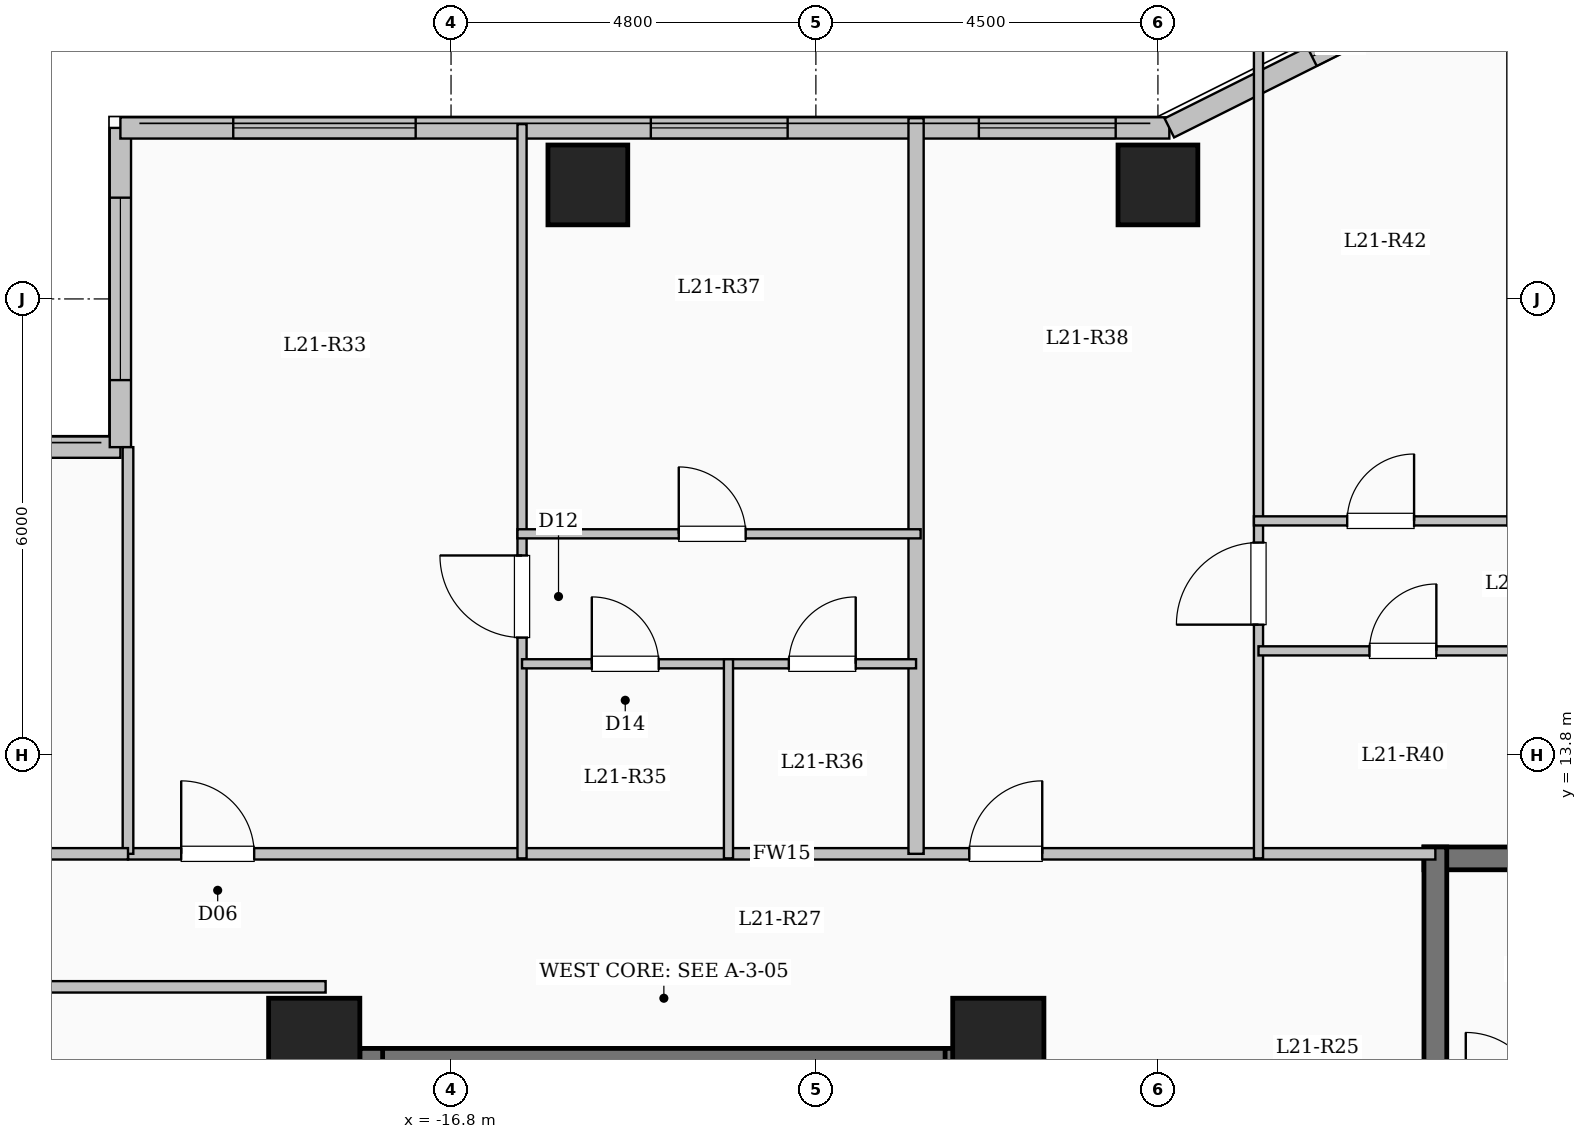
"""IFC4 building model, lengths in metres.
Left out: names, types, materials, properties, quantities, classifications, styles, units other than length and angle.
Written with IfcOpenShell. Run it as: python <this file> out.ifc"""

import sys

from ifc_helpers import new_model, si_unit, direction, frame, frame_2d, origin, origin_2d, place, context, subcontext, project, spatial, rectangle, extrude, element, fill, save


model = new_model("IFC4")
c1 = context("Model", 3, precision=1e-05, world=origin(), true_north=direction((0.0, 1.0)))
c2 = subcontext(c1, "Body", "Model", "MODEL_VIEW")
j1 = project(units=[si_unit("LENGTHUNIT", "METRE"), si_unit("PLANEANGLEUNIT", "RADIAN")], contexts=[c1])
p1 = place(None, origin())
s1 = spatial("IfcSite", under=j1, at=p1, CompositionType="ELEMENT")
p2 = place(p1, origin())
s2 = spatial("IfcBuilding", under=s1, at=p2, CompositionType="ELEMENT")
p3 = place(p2, frame((0.0, 0.0, 81.65)))
s3 = spatial("IfcBuildingStorey", under=s2, at=p3, CompositionType="ELEMENT", Elevation=81.65)
for number, where, z_axis, x_axis in (
    (1, (-9.6, 10.0, 0.0), (0.0, 0.0, 1.0), (1.0, 0.0, 0.0)),
    (2, (-18.6, 10.0, 0.0), (0.0, 0.0, 1.0), (1.0, 0.0, 0.0)),
):
    element("IfcColumn", number, at=place(p3, frame(where, z_axis=z_axis, x_axis=x_axis)), inside=s3, PredefinedType="COLUMN", context=c2, shape_type="SweptSolid", body=[
        extrude(rectangle(XDim=1.2, YDim=1.2, at=origin_2d()), origin(), (0.0, 0.0, 1.0), 3.35),
    ])
for number, where, z_axis, x_axis in (
    (3, (-15.0, 21.3, 0.0), (0.0, 0.0, 1.0), (1.0, 0.0, 0.0)),
    (4, (-7.5, 21.3, 0.0), (0.0, 0.0, 1.0), (1.0, 0.0, 0.0)),
):
    element("IfcColumn", number, at=place(p3, frame(where, z_axis=z_axis, x_axis=x_axis)), inside=s3, PredefinedType="COLUMN", context=c2, shape_type="SweptSolid", body=[
        extrude(rectangle(XDim=1.05, YDim=1.05, at=origin_2d()), origin(), (0.0, 0.0, 1.0), 3.35),
    ])
p4 = place(p3, frame((-26.85, 17.85, 0.0), z_axis=(0.0, 0.0, 1.0), x_axis=(1.0, 0.0, 0.0)))
e5 = element("IfcWall", 5, at=p4, inside=s3, PredefinedType="SOLIDWALL", context=c2, shape_type="SweptSolid", body=[
    extrude(rectangle(XDim=5.7, YDim=0.28, at=frame_2d((2.85, 0.0))), origin(), (0.0, 0.0, 1.0), 3.1),
])
p5 = place(p4, frame((1.875, 0.0, 0.9)))
e6 = element("IfcOpeningElement", 6, at=p5, cuts=e5, PredefinedType="OPENING", context=c2, shape_type="SweptSolid", body=[
    extrude(rectangle(XDim=2.0, YDim=1.7, at=frame_2d((1.0, 0.85))), frame((0.0, 0.15, 0.0), z_axis=(0.0, -1.0, 0.0), x_axis=(1.0, 0.0, 0.0)), (0.0, 0.0, 1.0), 0.3),
])
p6 = place(p3, frame((-21.15, 17.85, 0.0), z_axis=(0.0, 0.0, 1.0), x_axis=(0.0, 1.0, 0.0)))
e7 = element("IfcWall", 7, at=p6, inside=s3, PredefinedType="SOLIDWALL", context=c2, shape_type="SweptSolid", body=[
    extrude(rectangle(XDim=4.2, YDim=0.28, at=frame_2d((2.1, 0.0))), origin(), (0.0, 0.0, 1.0), 3.1),
])
p7 = place(p6, frame((0.882, 0.0, 0.9)))
e8 = element("IfcOpeningElement", 8, at=p7, cuts=e7, PredefinedType="OPENING", context=c2, shape_type="SweptSolid", body=[
    extrude(rectangle(XDim=2.4, YDim=1.8, at=frame_2d((1.2, 0.9))), frame((0.0, 0.15, 0.0), z_axis=(0.0, -1.0, 0.0), x_axis=(1.0, 0.0, 0.0)), (0.0, 0.0, 1.0), 0.3),
])
p8 = place(p3, frame((-21.15, 22.05, 0.0), z_axis=(0.0, 0.0, 1.0), x_axis=(1.0, 0.0, 0.0)))
e9 = element("IfcWall", 9, at=p8, inside=s3, PredefinedType="SOLIDWALL", context=c2, shape_type="SweptSolid", body=[
    extrude(rectangle(XDim=13.8, YDim=0.28, at=frame_2d((6.9, 0.0))), origin(), (0.0, 0.0, 1.0), 3.1),
])
p9 = place(p8, frame((1.485, 0.0, 0.9)))
e10 = element("IfcOpeningElement", 10, at=p9, cuts=e9, PredefinedType="OPENING", context=c2, shape_type="SweptSolid", body=[
    extrude(rectangle(XDim=2.4, YDim=1.8, at=frame_2d((1.2, 0.9))), frame((0.0, 0.15, 0.0), z_axis=(0.0, -1.0, 0.0), x_axis=(1.0, 0.0, 0.0)), (0.0, 0.0, 1.0), 0.3),
])
p10 = place(p8, frame((6.979, 0.0, 0.9)))
e11 = element("IfcOpeningElement", 11, at=p10, cuts=e9, PredefinedType="OPENING", context=c2, shape_type="SweptSolid", body=[
    extrude(rectangle(XDim=1.8, YDim=1.65, at=frame_2d((0.9, 0.825))), frame((0.0, 0.15, 0.0), z_axis=(0.0, -1.0, 0.0), x_axis=(1.0, 0.0, 0.0)), (0.0, 0.0, 1.0), 0.3),
])
p11 = place(p8, frame((11.294, 0.0, 0.9)))
e12 = element("IfcOpeningElement", 12, at=p11, cuts=e9, PredefinedType="OPENING", context=c2, shape_type="SweptSolid", body=[
    extrude(rectangle(XDim=1.8, YDim=1.65, at=frame_2d((0.9, 0.825))), frame((0.0, 0.15, 0.0), z_axis=(0.0, -1.0, 0.0), x_axis=(1.0, 0.0, 0.0)), (0.0, 0.0, 1.0), 0.3),
])
p12 = place(p3, frame((-7.35, 22.05, 0.0), z_axis=(0.0, 0.0, 1.0), x_axis=(0.894427191, 0.4472135955, 0.0)))
e13 = element("IfcWall", 13, at=p12, inside=s3, PredefinedType="SOLIDWALL", context=c2, shape_type="SweptSolid", body=[
    extrude(rectangle(XDim=3.354, YDim=0.28, at=frame_2d((1.677, 0.0))), origin(), (0.0, 0.0, 1.0), 3.1),
])
p13 = place(p12, frame((2.099, 0.0, 0.95)))
e14 = element("IfcOpeningElement", 14, at=p13, cuts=e13, PredefinedType="OPENING", context=c2, shape_type="SweptSolid", body=[
    extrude(rectangle(XDim=0.85, YDim=1.5, at=frame_2d((0.425, 0.75))), frame((0.0, 0.15, 0.0), z_axis=(0.0, -1.0, 0.0), x_axis=(1.0, 0.0, 0.0)), (0.0, 0.0, 1.0), 0.3),
])
p14 = place(p3, frame((-18.0, 9.79, 0.0), z_axis=(0.0, 0.0, 1.0), x_axis=(1.0, 0.0, 0.0)))
e15 = element("IfcWall", 15, at=p14, inside=s3, PredefinedType="SHEAR", context=c2, shape_type="SweptSolid", body=[
    extrude(rectangle(XDim=8.0, YDim=0.3, at=frame_2d((4.0, 0.0))), origin(), (0.0, 0.0, 1.0), 3.35),
])
for number, where, z_axis, x_axis in (
    (16, (-17.85, 6.35, 0.0), (0.0, 0.0, 1.0), (0.0, 1.0, 0.0)),
    (17, (-10.15, 6.35, 0.0), (0.0, 0.0, 1.0), (0.0, 1.0, 0.0)),
):
    element("IfcWall", number, at=place(p3, frame(where, z_axis=z_axis, x_axis=x_axis)), inside=s3, PredefinedType="SHEAR", context=c2, shape_type="SweptSolid", body=[
        extrude(rectangle(XDim=3.59, YDim=0.3, at=frame_2d((1.795, 0.0))), origin(), (0.0, 0.0, 1.0), 3.35),
    ])
p15 = place(p3, frame((-4.0, 12.44, 0.0), z_axis=(0.0, 0.0, 1.0), x_axis=(1.0, 0.0, 0.0)))
e18 = element("IfcWall", 18, at=p15, inside=s3, PredefinedType="SHEAR", context=c2, shape_type="SweptSolid", body=[
    extrude(rectangle(XDim=8.0, YDim=0.3, at=frame_2d((4.0, 0.0))), origin(), (0.0, 0.0, 1.0), 3.35),
])
p16 = place(p3, frame((-3.85, 9.0, 0.0), z_axis=(0.0, 0.0, 1.0), x_axis=(0.0, 1.0, 0.0)))
e19 = element("IfcWall", 19, at=p16, inside=s3, PredefinedType="SHEAR", context=c2, shape_type="SweptSolid", body=[
    extrude(rectangle(XDim=3.59, YDim=0.3, at=frame_2d((1.795, 0.0))), origin(), (0.0, 0.0, 1.0), 3.35),
])
p17 = place(p3, frame((-21.05, 12.5, 0.0), z_axis=(0.0, 0.0, 1.0), x_axis=(1.0, 0.0, 0.0)))
e20 = element("IfcWall", 20, at=p17, inside=s3, PredefinedType="PARTITIONING", context=c2, shape_type="SweptSolid", body=[
    extrude(rectangle(XDim=17.2, YDim=0.15, at=frame_2d((8.6, 0.0))), origin(), (0.0, 0.0, 1.0), 3.1),
])
p18 = place(p17, frame((0.7, 0.0, 0.0)))
e21 = element("IfcOpeningElement", 21, at=p18, cuts=e20, PredefinedType="OPENING", context=c2, shape_type="SweptSolid", body=[
    extrude(rectangle(XDim=0.96, YDim=2.15, at=frame_2d((0.48, 1.075))), frame((0.0, 0.085, 0.0), z_axis=(0.0, -1.0, 0.0), x_axis=(1.0, 0.0, 0.0)), (0.0, 0.0, 1.0), 0.17),
])
p19 = place(p17, frame((11.068, 0.0, 0.0)))
e22 = element("IfcOpeningElement", 22, at=p19, cuts=e20, PredefinedType="OPENING", context=c2, shape_type="SweptSolid", body=[
    extrude(rectangle(XDim=0.96, YDim=2.15, at=frame_2d((0.48, 1.075))), frame((0.0, 0.085, 0.0), z_axis=(0.0, -1.0, 0.0), x_axis=(1.0, 0.0, 0.0)), (0.0, 0.0, 1.0), 0.17),
])
p20 = place(p3, frame((-10.682, 12.5, 0.0), z_axis=(0.0, 0.0, 1.0), x_axis=(0.0, 1.0, 0.0)))
e23 = element("IfcWall", 23, at=p20, inside=s3, PredefinedType="SOLIDWALL", context=c2, shape_type="SweptSolid", body=[
    extrude(rectangle(XDim=9.678, YDim=0.2, at=frame_2d((4.839, 0.0))), origin(), (0.0, 0.0, 1.0), 3.1),
])
p21 = place(p3, frame((-15.866, 12.44, 0.0), z_axis=(0.0, 0.0, 1.0), x_axis=(0.0, 1.0, 0.0)))
e24 = element("IfcWall", 24, at=p21, inside=s3, PredefinedType="PARTITIONING", context=c2, shape_type="SweptSolid", body=[
    extrude(rectangle(XDim=9.66, YDim=0.12, at=frame_2d((4.83, 0.0))), origin(), (0.0, 0.0, 1.0), 3.1),
])
p22 = place(p21, frame((2.905, 0.0, 0.0)))
e25 = element("IfcOpeningElement", 25, at=p22, cuts=e24, PredefinedType="OPENING", context=c2, shape_type="SweptSolid", body=[
    extrude(rectangle(XDim=1.08, YDim=2.15, at=frame_2d((0.54, 1.075))), frame((0.0, 0.07, 0.0), z_axis=(0.0, -1.0, 0.0), x_axis=(1.0, 0.0, 0.0)), (0.0, 0.0, 1.0), 0.14),
])
p23 = place(p3, frame((-15.866, 15.0, 0.0), z_axis=(0.0, 0.0, 1.0), x_axis=(1.0, 0.0, 0.0)))
e26 = element("IfcWall", 26, at=p23, inside=s3, PredefinedType="PARTITIONING", context=c2, shape_type="SweptSolid", body=[
    extrude(rectangle(XDim=2.716, YDim=0.12, at=frame_2d((1.358, 0.0))), origin(), (0.0, 0.0, 1.0), 3.1),
])
p24 = place(p23, frame((0.918, 0.0, 0.0)))
e27 = element("IfcOpeningElement", 27, at=p24, cuts=e26, PredefinedType="OPENING", context=c2, shape_type="SweptSolid", body=[
    extrude(rectangle(XDim=0.88, YDim=2.1, at=frame_2d((0.44, 1.05))), frame((0.0, 0.07, 0.0), z_axis=(0.0, -1.0, 0.0), x_axis=(1.0, 0.0, 0.0)), (0.0, 0.0, 1.0), 0.14),
])
p25 = place(p3, frame((-13.15, 15.0, 0.0), z_axis=(0.0, 0.0, 1.0), x_axis=(1.0, 0.0, 0.0)))
e28 = element("IfcWall", 28, at=p25, inside=s3, PredefinedType="PARTITIONING", context=c2, shape_type="SweptSolid", body=[
    extrude(rectangle(XDim=2.468, YDim=0.12, at=frame_2d((1.234, 0.0))), origin(), (0.0, 0.0, 1.0), 3.1),
])
p26 = place(p25, frame((0.794, 0.0, 0.0)))
e29 = element("IfcOpeningElement", 29, at=p26, cuts=e28, PredefinedType="OPENING", context=c2, shape_type="SweptSolid", body=[
    extrude(rectangle(XDim=0.88, YDim=2.1, at=frame_2d((0.44, 1.05))), frame((0.0, 0.07, 0.0), z_axis=(0.0, -1.0, 0.0), x_axis=(1.0, 0.0, 0.0)), (0.0, 0.0, 1.0), 0.14),
])
p27 = place(p3, frame((-15.926, 16.71, 0.0), z_axis=(0.0, 0.0, 1.0), x_axis=(1.0, 0.0, 0.0)))
e30 = element("IfcWall", 30, at=p27, inside=s3, PredefinedType="PARTITIONING", context=c2, shape_type="SweptSolid", body=[
    extrude(rectangle(XDim=5.304, YDim=0.12, at=frame_2d((2.652, 0.0))), origin(), (0.0, 0.0, 1.0), 3.1),
])
p28 = place(p27, frame((2.122, 0.0, 0.0)))
e31 = element("IfcOpeningElement", 31, at=p28, cuts=e30, PredefinedType="OPENING", context=c2, shape_type="SweptSolid", body=[
    extrude(rectangle(XDim=0.88, YDim=2.1, at=frame_2d((0.44, 1.05))), frame((0.0, 0.07, 0.0), z_axis=(0.0, -1.0, 0.0), x_axis=(1.0, 0.0, 0.0)), (0.0, 0.0, 1.0), 0.14),
])
p29 = place(p3, frame((-13.15, 12.44, 0.0), z_axis=(0.0, 0.0, 1.0), x_axis=(0.0, 1.0, 0.0)))
e32 = element("IfcWall", 32, at=p29, inside=s3, PredefinedType="PARTITIONING", context=c2, shape_type="SweptSolid", body=[
    extrude(rectangle(XDim=2.62, YDim=0.12, at=frame_2d((1.31, 0.0))), origin(), (0.0, 0.0, 1.0), 3.1),
])
p30 = place(p3, frame((-6.177, 12.44, 0.0), z_axis=(0.0, 0.0, 1.0), x_axis=(0.0, 1.0, 0.0)))
e33 = element("IfcWall", 33, at=p30, inside=s3, PredefinedType="PARTITIONING", context=c2, shape_type="SweptSolid", body=[
    extrude(rectangle(XDim=10.85, YDim=0.12, at=frame_2d((5.425, 0.0))), origin(), (0.0, 0.0, 1.0), 3.1),
])
p31 = place(p30, frame((3.075, 0.0, 0.0)))
e34 = element("IfcOpeningElement", 34, at=p31, cuts=e33, PredefinedType="OPENING", context=c2, shape_type="SweptSolid", body=[
    extrude(rectangle(XDim=1.08, YDim=2.15, at=frame_2d((0.54, 1.075))), frame((0.0, 0.07, 0.0), z_axis=(0.0, -1.0, 0.0), x_axis=(1.0, 0.0, 0.0)), (0.0, 0.0, 1.0), 0.14),
])
p32 = place(p3, frame((-6.177, 15.17, 0.0), z_axis=(0.0, 0.0, 1.0), x_axis=(1.0, 0.0, 0.0)))
e35 = element("IfcWall", 35, at=p32, inside=s3, PredefinedType="PARTITIONING", context=c2, shape_type="SweptSolid", body=[
    extrude(rectangle(XDim=3.8, YDim=0.12, at=frame_2d((1.9, 0.0))), origin(), (0.0, 0.0, 1.0), 3.1),
])
p33 = place(p32, frame((1.46, 0.0, 0.0)))
e36 = element("IfcOpeningElement", 36, at=p33, cuts=e35, PredefinedType="OPENING", context=c2, shape_type="SweptSolid", body=[
    extrude(rectangle(XDim=0.88, YDim=2.1, at=frame_2d((0.44, 1.05))), frame((0.0, 0.07, 0.0), z_axis=(0.0, -1.0, 0.0), x_axis=(1.0, 0.0, 0.0)), (0.0, 0.0, 1.0), 0.14),
])
p34 = place(p3, frame((-6.237, 16.88, 0.0), z_axis=(0.0, 0.0, 1.0), x_axis=(1.0, 0.0, 0.0)))
e37 = element("IfcWall", 37, at=p34, inside=s3, PredefinedType="PARTITIONING", context=c2, shape_type="SweptSolid", body=[
    extrude(rectangle(XDim=6.847, YDim=0.12, at=frame_2d((3.424, 0.0))), origin(), (0.0, 0.0, 1.0), 3.1),
])
p35 = place(p34, frame((1.227, 0.0, 0.0)))
e38 = element("IfcOpeningElement", 38, at=p35, cuts=e37, PredefinedType="OPENING", context=c2, shape_type="SweptSolid", body=[
    extrude(rectangle(XDim=0.88, YDim=2.1, at=frame_2d((0.44, 1.05))), frame((0.0, 0.07, 0.0), z_axis=(0.0, -1.0, 0.0), x_axis=(1.0, 0.0, 0.0)), (0.0, 0.0, 1.0), 0.14),
])
p36 = place(p34, frame((4.56, 0.0, 0.0)))
e39 = element("IfcOpeningElement", 39, at=p36, cuts=e37, PredefinedType="OPENING", context=c2, shape_type="SweptSolid", body=[
    extrude(rectangle(XDim=0.88, YDim=2.1, at=frame_2d((0.44, 1.05))), frame((0.0, 0.07, 0.0), z_axis=(0.0, -1.0, 0.0), x_axis=(1.0, 0.0, 0.0)), (0.0, 0.0, 1.0), 0.14),
])
p37 = place(p3, frame((-2.843, 16.82, 0.0), z_axis=(0.0, 0.0, 1.0), x_axis=(0.0, 1.0, 0.0)))
e40 = element("IfcWall", 40, at=p37, inside=s3, PredefinedType="PARTITIONING", context=c2, shape_type="SweptSolid", body=[
    extrude(rectangle(XDim=6.76, YDim=0.12, at=frame_2d((3.38, 0.0))), origin(), (0.0, 0.0, 1.0), 3.1),
])
p38 = place(p3, frame((-26.88, 10.75, 0.0), z_axis=(0.0, 0.0, 1.0), x_axis=(1.0, 0.0, 0.0)))
e41 = element("IfcWall", 41, at=p38, inside=s3, PredefinedType="PARTITIONING", context=c2, shape_type="SweptSolid", body=[
    extrude(rectangle(XDim=8.43, YDim=0.15, at=frame_2d((4.215, 0.0))), origin(), (0.0, 0.0, 1.0), 3.1),
])
p39 = place(p3, frame((-21.05, 12.5, 0.0), z_axis=(0.0, 0.0, 1.0), x_axis=(0.0, 1.0, 0.0)))
e42 = element("IfcWall", 42, at=p39, inside=s3, PredefinedType="PARTITIONING", context=c2, shape_type="SweptSolid", body=[
    extrude(rectangle(XDim=5.35, YDim=0.14, at=frame_2d((2.675, 0.0))), origin(), (0.0, 0.0, 1.0), 3.1),
])
p40 = place(p3, frame((-26.88, 12.5, 0.0), z_axis=(0.0, 0.0, 1.0), x_axis=(1.0, 0.0, 0.0)))
e43 = element("IfcWall", 43, at=p40, inside=s3, PredefinedType="PARTITIONING", context=c2, shape_type="SweptSolid", body=[
    extrude(rectangle(XDim=5.83, YDim=0.15, at=frame_2d((2.915, 0.0))), origin(), (0.0, 0.0, 1.0), 3.1),
])
p41 = place(p40, frame((2.44, 0.0, 0.0)))
e44 = element("IfcOpeningElement", 44, at=p41, cuts=e43, PredefinedType="OPENING", context=c2, shape_type="SweptSolid", body=[
    extrude(rectangle(XDim=0.95, YDim=2.15, at=frame_2d((0.475, 1.075))), frame((0.0, 0.085, 0.0), z_axis=(0.0, -1.0, 0.0), x_axis=(1.0, 0.0, 0.0)), (0.0, 0.0, 1.0), 0.17),
])
p42 = place(p7, origin())
e45 = element("IfcWindow", 45, at=p42, inside=s3, PartitioningType="SINGLE_PANEL", PredefinedType="WINDOW", context=c2, shape_type="SweptSolid", body=[
    extrude(rectangle(XDim=2.4, YDim=1.8, at=frame_2d((1.2, 0.9))), frame((0.0, 0.03, 0.0), z_axis=(0.0, -1.0, 0.0), x_axis=(1.0, 0.0, 0.0)), (0.0, 0.0, 1.0), 0.06),
])
fill(e8, e45)
p43 = place(p9, origin())
e46 = element("IfcWindow", 46, at=p43, inside=s3, PartitioningType="SINGLE_PANEL", PredefinedType="WINDOW", context=c2, shape_type="SweptSolid", body=[
    extrude(rectangle(XDim=2.4, YDim=1.8, at=frame_2d((1.2, 0.9))), frame((0.0, 0.03, 0.0), z_axis=(0.0, -1.0, 0.0), x_axis=(1.0, 0.0, 0.0)), (0.0, 0.0, 1.0), 0.06),
])
fill(e10, e46)
p44 = place(p10, origin())
e47 = element("IfcWindow", 47, at=p44, inside=s3, PartitioningType="SINGLE_PANEL", PredefinedType="WINDOW", context=c2, shape_type="SweptSolid", body=[
    extrude(rectangle(XDim=1.8, YDim=1.65, at=frame_2d((0.9, 0.825))), frame((0.0, 0.03, 0.0), z_axis=(0.0, -1.0, 0.0), x_axis=(1.0, 0.0, 0.0)), (0.0, 0.0, 1.0), 0.06),
])
fill(e11, e47)
p45 = place(p11, origin())
e48 = element("IfcWindow", 48, at=p45, inside=s3, PartitioningType="SINGLE_PANEL", PredefinedType="WINDOW", context=c2, shape_type="SweptSolid", body=[
    extrude(rectangle(XDim=1.8, YDim=1.65, at=frame_2d((0.9, 0.825))), frame((0.0, 0.03, 0.0), z_axis=(0.0, -1.0, 0.0), x_axis=(1.0, 0.0, 0.0)), (0.0, 0.0, 1.0), 0.06),
])
fill(e12, e48)
p46 = place(p13, origin())
e49 = element("IfcWindow", 49, at=p46, inside=s3, PartitioningType="SINGLE_PANEL", PredefinedType="WINDOW", context=c2, shape_type="SweptSolid", body=[
    extrude(rectangle(XDim=0.85, YDim=1.5, at=frame_2d((0.425, 0.75))), frame((0.0, 0.03, 0.0), z_axis=(0.0, -1.0, 0.0), x_axis=(1.0, 0.0, 0.0)), (0.0, 0.0, 1.0), 0.06),
])
fill(e14, e49)
p47 = place(p18, origin())
e50 = element("IfcDoor", 50, at=p47, inside=s3, OperationType="SINGLE_SWING_LEFT", PredefinedType="DOOR", context=c2, shape_type="SweptSolid", body=[
    extrude(rectangle(XDim=0.96, YDim=2.15, at=frame_2d((0.48, 1.075))), frame((0.0, 0.025, 0.0), z_axis=(0.0, -1.0, 0.0), x_axis=(1.0, 0.0, 0.0)), (0.0, 0.0, 1.0), 0.05),
])
fill(e21, e50)
p48 = place(p22, origin())
e51 = element("IfcDoor", 51, at=p48, inside=s3, OperationType="SINGLE_SWING_RIGHT", PredefinedType="DOOR", context=c2, shape_type="SweptSolid", body=[
    extrude(rectangle(XDim=1.08, YDim=2.15, at=frame_2d((0.54, 1.075))), frame((0.0, 0.025, 0.0), z_axis=(0.0, -1.0, 0.0), x_axis=(1.0, 0.0, 0.0)), (0.0, 0.0, 1.0), 0.05),
])
fill(e25, e51)
p49 = place(p24, origin())
e52 = element("IfcDoor", 52, at=p49, inside=s3, OperationType="SINGLE_SWING_LEFT", PredefinedType="DOOR", context=c2, shape_type="SweptSolid", body=[
    extrude(rectangle(XDim=0.88, YDim=2.1, at=frame_2d((0.44, 1.05))), frame((0.0, 0.025, 0.0), z_axis=(0.0, -1.0, 0.0), x_axis=(1.0, 0.0, 0.0)), (0.0, 0.0, 1.0), 0.05),
])
fill(e27, e52)
p50 = place(p26, origin())
e53 = element("IfcDoor", 53, at=p50, inside=s3, OperationType="SINGLE_SWING_RIGHT", PredefinedType="DOOR", context=c2, shape_type="SweptSolid", body=[
    extrude(rectangle(XDim=0.88, YDim=2.1, at=frame_2d((0.44, 1.05))), frame((0.0, 0.025, 0.0), z_axis=(0.0, -1.0, 0.0), x_axis=(1.0, 0.0, 0.0)), (0.0, 0.0, 1.0), 0.05),
])
fill(e29, e53)
p51 = place(p28, origin())
e54 = element("IfcDoor", 54, at=p51, inside=s3, OperationType="SINGLE_SWING_LEFT", PredefinedType="DOOR", context=c2, shape_type="SweptSolid", body=[
    extrude(rectangle(XDim=0.88, YDim=2.1, at=frame_2d((0.44, 1.05))), frame((0.0, 0.025, 0.0), z_axis=(0.0, -1.0, 0.0), x_axis=(1.0, 0.0, 0.0)), (0.0, 0.0, 1.0), 0.05),
])
fill(e31, e54)
p52 = place(p19, origin())
e55 = element("IfcDoor", 55, at=p52, inside=s3, OperationType="SINGLE_SWING_RIGHT", PredefinedType="DOOR", context=c2, shape_type="SweptSolid", body=[
    extrude(rectangle(XDim=0.96, YDim=2.15, at=frame_2d((0.48, 1.075))), frame((0.0, 0.025, 0.0), z_axis=(0.0, -1.0, 0.0), x_axis=(1.0, 0.0, 0.0)), (0.0, 0.0, 1.0), 0.05),
])
fill(e22, e55)
p53 = place(p31, origin())
e56 = element("IfcDoor", 56, at=p53, inside=s3, OperationType="SINGLE_SWING_LEFT", PredefinedType="DOOR", context=c2, shape_type="SweptSolid", body=[
    extrude(rectangle(XDim=1.08, YDim=2.15, at=frame_2d((0.54, 1.075))), frame((0.0, 0.025, 0.0), z_axis=(0.0, -1.0, 0.0), x_axis=(1.0, 0.0, 0.0)), (0.0, 0.0, 1.0), 0.05),
])
fill(e34, e56)
p54 = place(p33, origin())
e57 = element("IfcDoor", 57, at=p54, inside=s3, OperationType="SINGLE_SWING_RIGHT", PredefinedType="DOOR", context=c2, shape_type="SweptSolid", body=[
    extrude(rectangle(XDim=0.88, YDim=2.1, at=frame_2d((0.44, 1.05))), frame((0.0, 0.025, 0.0), z_axis=(0.0, -1.0, 0.0), x_axis=(1.0, 0.0, 0.0)), (0.0, 0.0, 1.0), 0.05),
])
fill(e36, e57)
p55 = place(p35, origin())
e58 = element("IfcDoor", 58, at=p55, inside=s3, OperationType="SINGLE_SWING_RIGHT", PredefinedType="DOOR", context=c2, shape_type="SweptSolid", body=[
    extrude(rectangle(XDim=0.88, YDim=2.1, at=frame_2d((0.44, 1.05))), frame((0.0, 0.025, 0.0), z_axis=(0.0, -1.0, 0.0), x_axis=(1.0, 0.0, 0.0)), (0.0, 0.0, 1.0), 0.05),
])
fill(e38, e58)
save(model, sys.argv[1])
